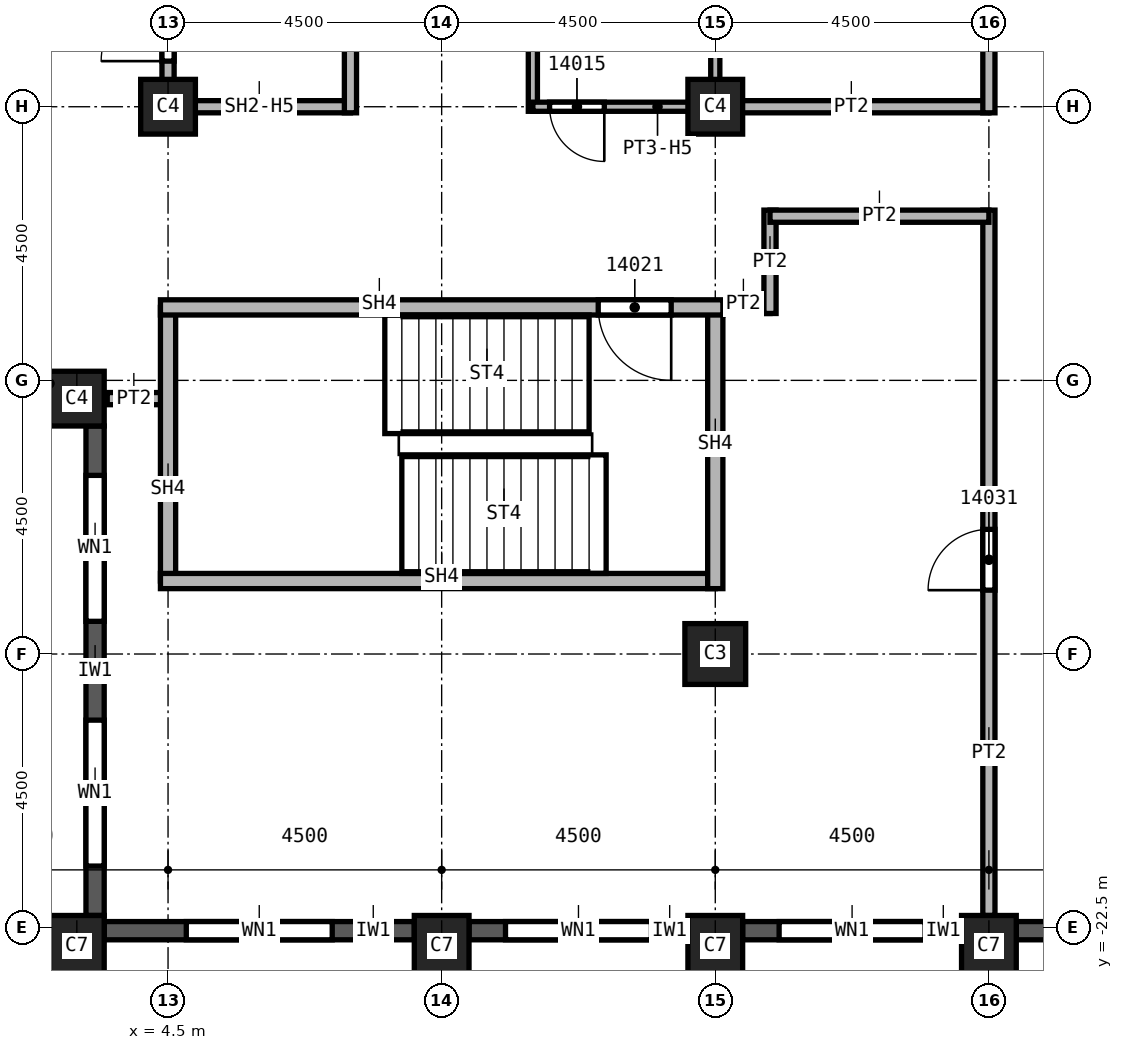
"""IFC4 building model, lengths in metres.
Left out: names, types, materials, properties, quantities, classifications, styles, units other than length and angle.
Written with IfcOpenShell. Run it as: python <this file> out.ifc"""

import sys

from ifc_helpers import new_model, si_unit, direction, frame, frame_2d, origin, origin_2d, place, context, subcontext, project, spatial, rectangle, extrude, element, fill, save


model = new_model("IFC4")
c1 = context("Model", 3, precision=1e-05, world=origin(), true_north=direction((0.0, 1.0)))
c2 = subcontext(c1, "Body", "Model", "MODEL_VIEW")
j1 = project(units=[si_unit("LENGTHUNIT", "METRE"), si_unit("PLANEANGLEUNIT", "RADIAN")], contexts=[c1])
p1 = place(None, origin())
s1 = spatial("IfcSite", under=j1, at=p1, CompositionType="ELEMENT")
p2 = place(p1, origin())
s2 = spatial("IfcBuilding", under=s1, at=p2, CompositionType="ELEMENT")
p3 = place(p2, frame((0.0, 0.0, 220.0)))
s3 = spatial("IfcBuildingStorey", under=s2, at=p3, CompositionType="ELEMENT", Elevation=220.0)
p4 = place(p3, frame((13.5, -18.0, 0.0), z_axis=(0.0, 0.0, 1.0), x_axis=(1.0, 0.0, 0.0)))
e1 = element("IfcColumn", 1, at=p4, inside=s3, PredefinedType="COLUMN", context=c2, shape_type="SweptSolid", body=[
    extrude(rectangle(XDim=1.0, YDim=1.0, at=origin_2d()), origin(), (0.0, 0.0, 1.0), 3.72),
])
for number, where, z_axis, x_axis in (
    (2, (4.5, -9.0, 0.0), (0.0, 0.0, 1.0), (1.0, 0.0, 0.0)),
    (3, (13.5, -9.0, 0.0), (0.0, 0.0, 1.0), (1.0, 0.0, 0.0)),
):
    element("IfcColumn", number, at=place(p3, frame(where, z_axis=z_axis, x_axis=x_axis)), inside=s3, PredefinedType="COLUMN", context=c2, shape_type="SweptSolid", body=[
        extrude(rectangle(XDim=0.9, YDim=0.9, at=origin_2d()), origin(), (0.0, 0.0, 1.0), 3.72),
    ])
for number, where, z_axis, x_axis in (
    (4, (3.0, -22.8, 0.0), (0.0, 0.0, 1.0), (1.0, 0.0, 0.0)),
    (5, (9.0, -22.8, 0.0), (0.0, 0.0, 1.0), (1.0, 0.0, 0.0)),
    (6, (13.5, -22.8, 0.0), (0.0, 0.0, 1.0), (1.0, 0.0, 0.0)),
    (7, (18.0, -22.8, 0.0), (0.0, 0.0, 1.0), (1.0, 0.0, 0.0)),
):
    element("IfcColumn", number, at=place(p3, frame(where, z_axis=z_axis, x_axis=x_axis)), inside=s3, PredefinedType="COLUMN", context=c2, shape_type="SweptSolid", body=[
        extrude(rectangle(XDim=0.9, YDim=1.0, at=origin_2d()), origin(), (0.0, 0.0, 1.0), 3.72),
    ])
p5 = place(p3, frame((3.0, -13.8, 0.0), z_axis=(0.0, 0.0, 1.0), x_axis=(1.0, 0.0, 0.0)))
e8 = element("IfcColumn", 8, at=p5, inside=s3, PredefinedType="COLUMN", context=c2, shape_type="SweptSolid", body=[
    extrude(rectangle(XDim=0.9, YDim=0.9, at=origin_2d()), origin(), (0.0, 0.0, 1.0), 3.72),
])
p6 = place(p3, frame((3.3, -14.25, 0.0), z_axis=(0.0, 0.0, 1.0), x_axis=(0.0, -1.0, 0.0)))
e9 = element("IfcWall", 9, at=p6, inside=s3, PredefinedType="SOLIDWALL", context=c2, shape_type="SweptSolid", body=[
    extrude(rectangle(XDim=8.05, YDim=0.3, at=frame_2d((4.025, 0.0))), origin(), (0.0, 0.0, 1.0), 3.12),
])
p7 = place(p6, frame((0.812, 0.0, 0.8)))
e10 = element("IfcOpeningElement", 10, at=p7, cuts=e9, PredefinedType="OPENING", context=c2, shape_type="SweptSolid", body=[
    extrude(rectangle(XDim=2.4, YDim=1.95, at=frame_2d((1.2, 0.975))), frame((0.0, 0.15, 0.0), z_axis=(0.0, -1.0, 0.0), x_axis=(1.0, 0.0, 0.0)), (0.0, 0.0, 1.0), 0.3),
])
p8 = place(p6, frame((4.837, 0.0, 0.8)))
e11 = element("IfcOpeningElement", 11, at=p8, cuts=e9, PredefinedType="OPENING", context=c2, shape_type="SweptSolid", body=[
    extrude(rectangle(XDim=2.4, YDim=1.95, at=frame_2d((1.2, 0.975))), frame((0.0, 0.15, 0.0), z_axis=(0.0, -1.0, 0.0), x_axis=(1.0, 0.0, 0.0)), (0.0, 0.0, 1.0), 0.3),
])
p9 = place(p3, frame((3.45, -22.55, 0.0), z_axis=(0.0, 0.0, 1.0), x_axis=(1.0, 0.0, 0.0)))
e12 = element("IfcWall", 12, at=p9, inside=s3, PredefinedType="SOLIDWALL", context=c2, shape_type="SweptSolid", body=[
    extrude(rectangle(XDim=5.1, YDim=0.3, at=frame_2d((2.55, 0.0))), origin(), (0.0, 0.0, 1.0), 3.12),
])
p10 = place(p9, frame((1.35, 0.0, 0.8)))
e13 = element("IfcOpeningElement", 13, at=p10, cuts=e12, PredefinedType="OPENING", context=c2, shape_type="SweptSolid", body=[
    extrude(rectangle(XDim=2.4, YDim=1.95, at=frame_2d((1.2, 0.975))), frame((0.0, 0.15, 0.0), z_axis=(0.0, -1.0, 0.0), x_axis=(1.0, 0.0, 0.0)), (0.0, 0.0, 1.0), 0.3),
])
p11 = place(p3, frame((9.45, -22.55, 0.0), z_axis=(0.0, 0.0, 1.0), x_axis=(1.0, 0.0, 0.0)))
e14 = element("IfcWall", 14, at=p11, inside=s3, PredefinedType="SOLIDWALL", context=c2, shape_type="SweptSolid", body=[
    extrude(rectangle(XDim=3.6, YDim=0.3, at=frame_2d((1.8, 0.0))), origin(), (0.0, 0.0, 1.0), 3.12),
])
p12 = place(p11, frame((0.6, 0.0, 0.8)))
e15 = element("IfcOpeningElement", 15, at=p12, cuts=e14, PredefinedType="OPENING", context=c2, shape_type="SweptSolid", body=[
    extrude(rectangle(XDim=2.4, YDim=1.95, at=frame_2d((1.2, 0.975))), frame((0.0, 0.15, 0.0), z_axis=(0.0, -1.0, 0.0), x_axis=(1.0, 0.0, 0.0)), (0.0, 0.0, 1.0), 0.3),
])
p13 = place(p3, frame((13.95, -22.55, 0.0), z_axis=(0.0, 0.0, 1.0), x_axis=(1.0, 0.0, 0.0)))
e16 = element("IfcWall", 16, at=p13, inside=s3, PredefinedType="SOLIDWALL", context=c2, shape_type="SweptSolid", body=[
    extrude(rectangle(XDim=3.6, YDim=0.3, at=frame_2d((1.8, 0.0))), origin(), (0.0, 0.0, 1.0), 3.12),
])
p14 = place(p13, frame((0.6, 0.0, 0.8)))
e17 = element("IfcOpeningElement", 17, at=p14, cuts=e16, PredefinedType="OPENING", context=c2, shape_type="SweptSolid", body=[
    extrude(rectangle(XDim=2.4, YDim=1.95, at=frame_2d((1.2, 0.975))), frame((0.0, 0.15, 0.0), z_axis=(0.0, -1.0, 0.0), x_axis=(1.0, 0.0, 0.0)), (0.0, 0.0, 1.0), 0.3),
])
p15 = place(p3, frame((18.45, -22.55, 0.0), z_axis=(0.0, 0.0, 1.0), x_axis=(1.0, 0.0, 0.0)))
e18 = element("IfcWall", 18, at=p15, inside=s3, PredefinedType="SOLIDWALL", context=c2, shape_type="SweptSolid", body=[
    extrude(rectangle(XDim=3.6, YDim=0.3, at=frame_2d((1.8, 0.0))), origin(), (0.0, 0.0, 1.0), 3.12),
])
p16 = place(p15, frame((0.625, 0.0, 0.8)))
e19 = element("IfcOpeningElement", 19, at=p16, cuts=e18, PredefinedType="OPENING", context=c2, shape_type="SweptSolid", body=[
    extrude(rectangle(XDim=0.6, YDim=1.95, at=frame_2d((0.3, 0.975))), frame((0.0, 0.15, 0.0), z_axis=(0.0, -1.0, 0.0), x_axis=(1.0, 0.0, 0.0)), (0.0, 0.0, 1.0), 0.3),
])
p17 = place(p15, frame((1.825, 0.0, 0.8)))
e20 = element("IfcOpeningElement", 20, at=p17, cuts=e18, PredefinedType="OPENING", context=c2, shape_type="SweptSolid", body=[
    extrude(rectangle(XDim=1.0, YDim=1.95, at=frame_2d((0.5, 0.975))), frame((0.0, 0.15, 0.0), z_axis=(0.0, -1.0, 0.0), x_axis=(1.0, 0.0, 0.0)), (0.0, 0.0, 1.0), 0.3),
])
p18 = place(p3, frame((4.5, -13.8, 0.0), z_axis=(0.0, 0.0, 1.0), x_axis=(-1.0, 0.0, 0.0)))
e21 = element("IfcWall", 21, at=p18, inside=s3, PredefinedType="PARTITIONING", context=c2, shape_type="SweptSolid", body=[
    extrude(rectangle(XDim=1.0, YDim=0.2, at=frame_2d((0.5, 0.0))), origin(), (0.0, 0.0, 1.0), 3.72),
])
p19 = place(p3, frame((13.5, -9.0, 0.0), z_axis=(0.0, 0.0, 1.0), x_axis=(1.0, 0.0, 0.0)))
e22 = element("IfcWall", 22, at=p19, inside=s3, PredefinedType="PARTITIONING", context=c2, shape_type="SweptSolid", body=[
    extrude(rectangle(XDim=4.5, YDim=0.2, at=frame_2d((2.25, 0.0))), origin(), (0.0, 0.0, 1.0), 3.72),
])
p20 = place(p3, frame((14.4, -12.3, 0.0), z_axis=(0.0, 0.0, 1.0), x_axis=(-1.0, 0.0, 0.0)))
e23 = element("IfcWall", 23, at=p20, inside=s3, PredefinedType="PARTITIONING", context=c2, shape_type="SweptSolid", body=[
    extrude(rectangle(XDim=1.025, YDim=0.2, at=frame_2d((0.512, 0.0))), origin(), (0.0, 0.0, 1.0), 3.72),
])
p21 = place(p3, frame((14.4, -10.7, 0.0), z_axis=(0.0, 0.0, 1.0), x_axis=(0.0, -1.0, 0.0)))
e24 = element("IfcWall", 24, at=p21, inside=s3, PredefinedType="PARTITIONING", context=c2, shape_type="SweptSolid", body=[
    extrude(rectangle(XDim=1.7, YDim=0.2, at=frame_2d((0.85, 0.0))), origin(), (0.0, 0.0, 1.0), 3.72),
])
p22 = place(p3, frame((18.0, -22.3, 0.0), z_axis=(0.0, 0.0, 1.0), x_axis=(0.0, 1.0, 0.0)))
e25 = element("IfcWall", 25, at=p22, inside=s3, PredefinedType="PARTITIONING", context=c2, shape_type="SweptSolid", body=[
    extrude(rectangle(XDim=11.6, YDim=0.2, at=frame_2d((5.8, 0.0))), origin(), (0.0, 0.0, 1.0), 3.72),
])
p23 = place(p22, frame((5.35, 0.0, 0.0)))
e26 = element("IfcOpeningElement", 26, at=p23, cuts=e25, PredefinedType="OPENING", context=c2, shape_type="SweptSolid", body=[
    extrude(rectangle(XDim=1.0, YDim=2.1, at=frame_2d((0.5, 1.05))), frame((0.0, 0.1, 0.0), z_axis=(0.0, -1.0, 0.0), x_axis=(1.0, 0.0, 0.0)), (0.0, 0.0, 1.0), 0.2),
])
p24 = place(p3, frame((18.0, -10.8, 0.0), z_axis=(0.0, 0.0, 1.0), x_axis=(-1.0, 0.0, 0.0)))
e27 = element("IfcWall", 27, at=p24, inside=s3, PredefinedType="PARTITIONING", context=c2, shape_type="SweptSolid", body=[
    extrude(rectangle(XDim=3.6, YDim=0.2, at=frame_2d((1.8, 0.0))), origin(), (0.0, 0.0, 1.0), 3.72),
])
p25 = place(p3, frame((18.0, -9.1, 0.0), z_axis=(0.0, 0.0, 1.0), x_axis=(0.0, 1.0, 0.0)))
e28 = element("IfcWall", 28, at=p25, inside=s3, PredefinedType="PARTITIONING", context=c2, shape_type="SweptSolid", body=[
    extrude(rectangle(XDim=18.2, YDim=0.2, at=frame_2d((9.1, 0.0))), origin(), (0.0, 0.0, 1.0), 3.72),
])
p26 = place(p25, frame((4.3, 0.0, 0.0)))
e29 = element("IfcOpeningElement", 29, at=p26, cuts=e28, PredefinedType="OPENING", context=c2, shape_type="SweptSolid", body=[
    extrude(rectangle(XDim=1.0, YDim=2.1, at=frame_2d((0.5, 1.05))), frame((0.0, 0.1, 0.0), z_axis=(0.0, -1.0, 0.0), x_axis=(1.0, 0.0, 0.0)), (0.0, 0.0, 1.0), 0.2),
])
p27 = place(p25, frame((12.4, 0.0, 0.0)))
e30 = element("IfcOpeningElement", 30, at=p27, cuts=e28, PredefinedType="OPENING", context=c2, shape_type="SweptSolid", body=[
    extrude(rectangle(XDim=1.0, YDim=2.1, at=frame_2d((0.5, 1.05))), frame((0.0, 0.1, 0.0), z_axis=(0.0, -1.0, 0.0), x_axis=(1.0, 0.0, 0.0)), (0.0, 0.0, 1.0), 0.2),
])
p28 = place(p3, frame((4.5, -9.1, 0.0), z_axis=(0.0, 0.0, 1.0), x_axis=(0.0, 1.0, 0.0)))
e31 = element("IfcWall", 31, at=p28, inside=s3, PredefinedType="SOLIDWALL", context=c2, shape_type="SweptSolid", body=[
    extrude(rectangle(XDim=3.1, YDim=0.2, at=frame_2d((1.55, 0.0))), origin(), (0.0, 0.0, 1.0), 2.958),
])
p29 = place(p28, frame((0.85, 0.0, 0.0)))
e32 = element("IfcOpeningElement", 32, at=p29, cuts=e31, PredefinedType="OPENING", context=c2, shape_type="SweptSolid", body=[
    extrude(rectangle(XDim=1.1, YDim=2.1, at=frame_2d((0.55, 1.05))), frame((0.0, 0.1, 0.0), z_axis=(0.0, -1.0, 0.0), x_axis=(1.0, 0.0, 0.0)), (0.0, 0.0, 1.0), 0.2),
])
p30 = place(p3, frame((7.5, -9.0, 0.0), z_axis=(0.0, 0.0, 1.0), x_axis=(-1.0, 0.0, 0.0)))
e33 = element("IfcWall", 33, at=p30, inside=s3, PredefinedType="SOLIDWALL", context=c2, shape_type="SweptSolid", body=[
    extrude(rectangle(XDim=3.0, YDim=0.2, at=frame_2d((1.5, 0.0))), origin(), (0.0, 0.0, 1.0), 2.958),
])
p31 = place(p3, frame((7.5, -6.0, 0.0), z_axis=(0.0, 0.0, 1.0), x_axis=(0.0, -1.0, 0.0)))
e34 = element("IfcWall", 34, at=p31, inside=s3, PredefinedType="SOLIDWALL", context=c2, shape_type="SweptSolid", body=[
    extrude(rectangle(XDim=3.1, YDim=0.2, at=frame_2d((1.55, 0.0))), origin(), (0.0, 0.0, 1.0), 3.72),
])
p32 = place(p3, frame((4.5, -16.8, 0.0), z_axis=(0.0, 0.0, 1.0), x_axis=(0.0, 1.0, 0.0)))
e35 = element("IfcWall", 35, at=p32, inside=s3, PredefinedType="SOLIDWALL", context=c2, shape_type="SweptSolid", body=[
    extrude(rectangle(XDim=4.5, YDim=0.25, at=frame_2d((2.25, 0.0))), origin(), (0.0, 0.0, 1.0), 3.72),
])
p33 = place(p3, frame((13.5, -16.8, 0.0), z_axis=(0.0, 0.0, 1.0), x_axis=(-1.0, 0.0, 0.0)))
e36 = element("IfcWall", 36, at=p33, inside=s3, PredefinedType="SOLIDWALL", context=c2, shape_type="SweptSolid", body=[
    extrude(rectangle(XDim=9.125, YDim=0.25, at=frame_2d((4.562, 0.0))), origin(), (0.0, 0.0, 1.0), 3.72),
])
p34 = place(p3, frame((13.5, -12.3, 0.0), z_axis=(0.0, 0.0, 1.0), x_axis=(0.0, -1.0, 0.0)))
e37 = element("IfcWall", 37, at=p34, inside=s3, PredefinedType="SOLIDWALL", context=c2, shape_type="SweptSolid", body=[
    extrude(rectangle(XDim=4.625, YDim=0.25, at=frame_2d((2.312, 0.0))), origin(), (0.0, 0.0, 1.0), 3.72),
])
p35 = place(p3, frame((13.625, -12.3, 0.0), z_axis=(0.0, 0.0, 1.0), x_axis=(-1.0, 0.0, 0.0)))
e38 = element("IfcWall", 38, at=p35, inside=s3, PredefinedType="SOLIDWALL", context=c2, shape_type="SweptSolid", body=[
    extrude(rectangle(XDim=9.25, YDim=0.25, at=frame_2d((4.625, 0.0))), origin(), (0.0, 0.0, 1.0), 3.72),
])
p36 = place(p35, frame((0.85, 0.0, 0.0)))
e39 = element("IfcOpeningElement", 39, at=p36, cuts=e38, PredefinedType="OPENING", context=c2, shape_type="SweptSolid", body=[
    extrude(rectangle(XDim=1.2, YDim=2.1, at=frame_2d((0.6, 1.05))), frame((0.0, 0.125, 0.0), z_axis=(0.0, -1.0, 0.0), x_axis=(1.0, 0.0, 0.0)), (0.0, 0.0, 1.0), 0.25),
])
p37 = place(p3, frame((10.5, -6.925, 0.0), z_axis=(0.0, 0.0, 1.0), x_axis=(0.0, -1.0, 0.0)))
e40 = element("IfcWall", 40, at=p37, inside=s3, PredefinedType="PARTITIONING", context=c2, shape_type="SweptSolid", body=[
    extrude(rectangle(XDim=2.15, YDim=0.15, at=frame_2d((1.075, 0.0))), origin(), (0.0, 0.0, 1.0), 3.72),
])
p38 = place(p3, frame((13.5, -7.0, 0.0), z_axis=(0.0, 0.0, 1.0), x_axis=(0.0, -1.0, 0.0)))
e41 = element("IfcWall", 41, at=p38, inside=s3, PredefinedType="PARTITIONING", context=c2, shape_type="SweptSolid", body=[
    extrude(rectangle(XDim=2.1, YDim=0.15, at=frame_2d((1.05, 0.0))), origin(), (0.0, 0.0, 1.0), 2.958),
])
p39 = place(p3, frame((13.575, -9.0, 0.0), z_axis=(0.0, 0.0, 1.0), x_axis=(-1.0, 0.0, 0.0)))
e42 = element("IfcWall", 42, at=p39, inside=s3, PredefinedType="PARTITIONING", context=c2, shape_type="SweptSolid", body=[
    extrude(rectangle(XDim=3.075, YDim=0.15, at=frame_2d((1.538, 0.0))), origin(), (0.0, 0.0, 1.0), 2.958),
])
p40 = place(p39, frame((1.9, 0.0, 0.0)))
e43 = element("IfcOpeningElement", 43, at=p40, cuts=e42, PredefinedType="OPENING", context=c2, shape_type="SweptSolid", body=[
    extrude(rectangle(XDim=0.9, YDim=2.1, at=frame_2d((0.45, 1.05))), frame((0.0, 0.075, 0.0), z_axis=(0.0, -1.0, 0.0), x_axis=(1.0, 0.0, 0.0)), (0.0, 0.0, 1.0), 0.15),
])
p41 = place(p7, origin())
e44 = element("IfcWindow", 44, at=p41, inside=s3, PartitioningType="SINGLE_PANEL", PredefinedType="WINDOW", context=c2, shape_type="SweptSolid", body=[
    extrude(rectangle(XDim=2.4, YDim=1.95, at=frame_2d((1.2, 0.975))), frame((0.0, 0.03, 0.0), z_axis=(0.0, -1.0, 0.0), x_axis=(1.0, 0.0, 0.0)), (0.0, 0.0, 1.0), 0.06),
])
fill(e10, e44)
p42 = place(p8, origin())
e45 = element("IfcWindow", 45, at=p42, inside=s3, PartitioningType="SINGLE_PANEL", PredefinedType="WINDOW", context=c2, shape_type="SweptSolid", body=[
    extrude(rectangle(XDim=2.4, YDim=1.95, at=frame_2d((1.2, 0.975))), frame((0.0, 0.03, 0.0), z_axis=(0.0, -1.0, 0.0), x_axis=(1.0, 0.0, 0.0)), (0.0, 0.0, 1.0), 0.06),
])
fill(e11, e45)
p43 = place(p10, origin())
e46 = element("IfcWindow", 46, at=p43, inside=s3, PartitioningType="SINGLE_PANEL", PredefinedType="WINDOW", context=c2, shape_type="SweptSolid", body=[
    extrude(rectangle(XDim=2.4, YDim=1.95, at=frame_2d((1.2, 0.975))), frame((0.0, 0.03, 0.0), z_axis=(0.0, -1.0, 0.0), x_axis=(1.0, 0.0, 0.0)), (0.0, 0.0, 1.0), 0.06),
])
fill(e13, e46)
p44 = place(p12, origin())
e47 = element("IfcWindow", 47, at=p44, inside=s3, PartitioningType="SINGLE_PANEL", PredefinedType="WINDOW", context=c2, shape_type="SweptSolid", body=[
    extrude(rectangle(XDim=2.4, YDim=1.95, at=frame_2d((1.2, 0.975))), frame((0.0, 0.03, 0.0), z_axis=(0.0, -1.0, 0.0), x_axis=(1.0, 0.0, 0.0)), (0.0, 0.0, 1.0), 0.06),
])
fill(e15, e47)
p45 = place(p14, origin())
e48 = element("IfcWindow", 48, at=p45, inside=s3, PartitioningType="SINGLE_PANEL", PredefinedType="WINDOW", context=c2, shape_type="SweptSolid", body=[
    extrude(rectangle(XDim=2.4, YDim=1.95, at=frame_2d((1.2, 0.975))), frame((0.0, 0.03, 0.0), z_axis=(0.0, -1.0, 0.0), x_axis=(1.0, 0.0, 0.0)), (0.0, 0.0, 1.0), 0.06),
])
fill(e17, e48)
p46 = place(p29, origin())
e49 = element("IfcDoor", 49, at=p46, inside=s3, OperationType="SINGLE_SWING_LEFT", PredefinedType="DOOR", context=c2, shape_type="SweptSolid", body=[
    extrude(rectangle(XDim=1.1, YDim=2.1, at=frame_2d((0.55, 1.05))), frame((0.0, 0.025, 0.0), z_axis=(0.0, -1.0, 0.0), x_axis=(1.0, 0.0, 0.0)), (0.0, 0.0, 1.0), 0.05),
])
fill(e32, e49)
p47 = place(p40, origin())
e50 = element("IfcDoor", 50, at=p47, inside=s3, OperationType="SINGLE_SWING_RIGHT", PredefinedType="DOOR", context=c2, shape_type="SweptSolid", body=[
    extrude(rectangle(XDim=0.9, YDim=2.1, at=frame_2d((0.45, 1.05))), frame((0.0, 0.025, 0.0), z_axis=(0.0, -1.0, 0.0), x_axis=(1.0, 0.0, 0.0)), (0.0, 0.0, 1.0), 0.05),
])
fill(e43, e50)
p48 = place(p36, origin())
e51 = element("IfcDoor", 51, at=p48, inside=s3, OperationType="SINGLE_SWING_RIGHT", PredefinedType="DOOR", context=c2, shape_type="SweptSolid", body=[
    extrude(rectangle(XDim=1.2, YDim=2.1, at=frame_2d((0.6, 1.05))), frame((0.0, 0.025, 0.0), z_axis=(0.0, -1.0, 0.0), x_axis=(1.0, 0.0, 0.0)), (0.0, 0.0, 1.0), 0.05),
])
fill(e39, e51)
p49 = place(p23, origin())
e52 = element("IfcDoor", 52, at=p49, inside=s3, OperationType="SINGLE_SWING_RIGHT", PredefinedType="DOOR", context=c2, shape_type="SweptSolid", body=[
    extrude(rectangle(XDim=1.0, YDim=2.1, at=frame_2d((0.5, 1.05))), frame((0.0, 0.025, 0.0), z_axis=(0.0, -1.0, 0.0), x_axis=(1.0, 0.0, 0.0)), (0.0, 0.0, 1.0), 0.05),
])
fill(e26, e52)
save(model, sys.argv[1])
